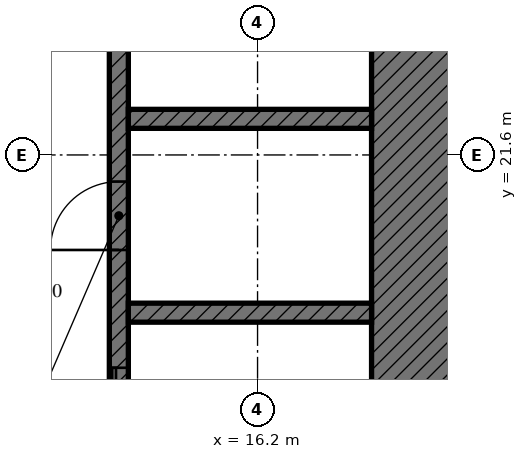
"""IFC4 building model, lengths in metres.
Left out: names, types, materials, properties, quantities, classifications, styles, units other than length and angle.
Written with IfcOpenShell. Run it as: python <this file> out.ifc"""

import sys

from ifc_helpers import new_model, si_unit, direction, frame, frame_2d, origin, place, context, subcontext, project, spatial, rectangle, extrude, element, fill, save


model = new_model("IFC4")
c1 = context("Model", 3, precision=1e-05, world=origin(), true_north=direction((0.0, 1.0)))
c2 = subcontext(c1, "Body", "Model", "MODEL_VIEW")
j1 = project(units=[si_unit("LENGTHUNIT", "METRE"), si_unit("PLANEANGLEUNIT", "RADIAN")], contexts=[c1])
p1 = place(None, origin())
s1 = spatial("IfcSite", under=j1, at=p1, CompositionType="ELEMENT")
p2 = place(p1, origin())
s2 = spatial("IfcBuilding", under=s1, at=p2, CompositionType="ELEMENT")
p3 = place(p2, frame((0.0, 0.0, 223.6)))
s3 = spatial("IfcBuildingStorey", under=s2, at=p3, CompositionType="ELEMENT", Elevation=223.6)
p4 = place(p3, frame((18.3, 32.4, 0.0), z_axis=(0.0, 0.0, 1.0), x_axis=(0.0, -1.0, 0.0)))
e1 = element("IfcWall", 1, at=p4, inside=s3, PredefinedType="SOLIDWALL", context=c2, shape_type="SweptSolid", body=[
    extrude(rectangle(XDim=16.2, YDim=1.2, at=frame_2d((8.1, 0.0))), origin(), (0.0, 0.0, 1.0), 3.0),
])
p5 = place(p3, frame((14.375, 17.1, 0.0), z_axis=(0.0, 0.0, 1.0), x_axis=(0.0, 1.0, 0.0)))
e2 = element("IfcWall", 2, at=p5, inside=s3, PredefinedType="SOLIDWALL", context=c2, shape_type="SweptSolid", body=[
    extrude(rectangle(XDim=14.4, YDim=0.25, at=frame_2d((7.2, 0.0))), origin(), (0.0, 0.0, 1.0), 3.0),
])
p6 = place(p5, frame((13.15, 0.0, 0.0)))
e3 = element("IfcOpeningElement", 3, at=p6, cuts=e2, PredefinedType="OPENING", context=c2, shape_type="SweptSolid", body=[
    extrude(rectangle(XDim=1.0, YDim=2.1, at=frame_2d((0.5, 1.05))), frame((0.0, 0.125, 0.0), z_axis=(0.0, -1.0, 0.0), x_axis=(1.0, 0.0, 0.0)), (0.0, 0.0, 1.0), 0.25),
])
p7 = place(p5, frame((0.6, 0.0, 0.0)))
e4 = element("IfcOpeningElement", 4, at=p7, cuts=e2, PredefinedType="OPENING", context=c2, shape_type="SweptSolid", body=[
    extrude(rectangle(XDim=1.1, YDim=2.1, at=frame_2d((0.55, 1.05))), frame((0.0, 0.125, 0.0), z_axis=(0.0, -1.0, 0.0), x_axis=(1.0, 0.0, 0.0)), (0.0, 0.0, 1.0), 0.25),
])
p8 = place(p5, frame((3.25, 0.0, 0.0)))
e5 = element("IfcOpeningElement", 5, at=p8, cuts=e2, PredefinedType="OPENING", context=c2, shape_type="SweptSolid", body=[
    extrude(rectangle(XDim=0.9, YDim=2.1, at=frame_2d((0.45, 1.05))), frame((0.0, 0.125, 0.0), z_axis=(0.0, -1.0, 0.0), x_axis=(1.0, 0.0, 0.0)), (0.0, 0.0, 1.0), 0.25),
])
for number, where, z_axis, x_axis in (
    (6, (14.5, 22.075, 0.0), (0.0, 0.0, 1.0), (1.0, 0.0, 0.0)),
    (7, (14.5, 19.525, 0.0), (0.0, 0.0, 1.0), (1.0, 0.0, 0.0)),
):
    element("IfcWall", number, at=place(p3, frame(where, z_axis=z_axis, x_axis=x_axis)), inside=s3, PredefinedType="SOLIDWALL", context=c2, shape_type="SweptSolid", body=[
        extrude(rectangle(XDim=3.2, YDim=0.25, at=frame_2d((1.6, 0.0))), origin(), (0.0, 0.0, 1.0), 3.0),
    ])
p9 = place(p7, origin())
e8 = element("IfcDoor", 8, at=p9, inside=s3, OperationType="DOUBLE_DOOR_SLIDING", PredefinedType="DOOR", context=c2, shape_type="SweptSolid", body=[
    extrude(rectangle(XDim=1.1, YDim=2.1, at=frame_2d((0.55, 1.05))), frame((0.0, 0.025, 0.0), z_axis=(0.0, -1.0, 0.0), x_axis=(1.0, 0.0, 0.0)), (0.0, 0.0, 1.0), 0.05),
])
fill(e4, e8)
p10 = place(p8, origin())
e9 = element("IfcDoor", 9, at=p10, inside=s3, OperationType="SINGLE_SWING_LEFT", PredefinedType="DOOR", context=c2, shape_type="SweptSolid", body=[
    extrude(rectangle(XDim=0.9, YDim=2.1, at=frame_2d((0.45, 1.05))), frame((0.0, 0.025, 0.0), z_axis=(0.0, -1.0, 0.0), x_axis=(1.0, 0.0, 0.0)), (0.0, 0.0, 1.0), 0.05),
])
fill(e5, e9)
save(model, sys.argv[1])
